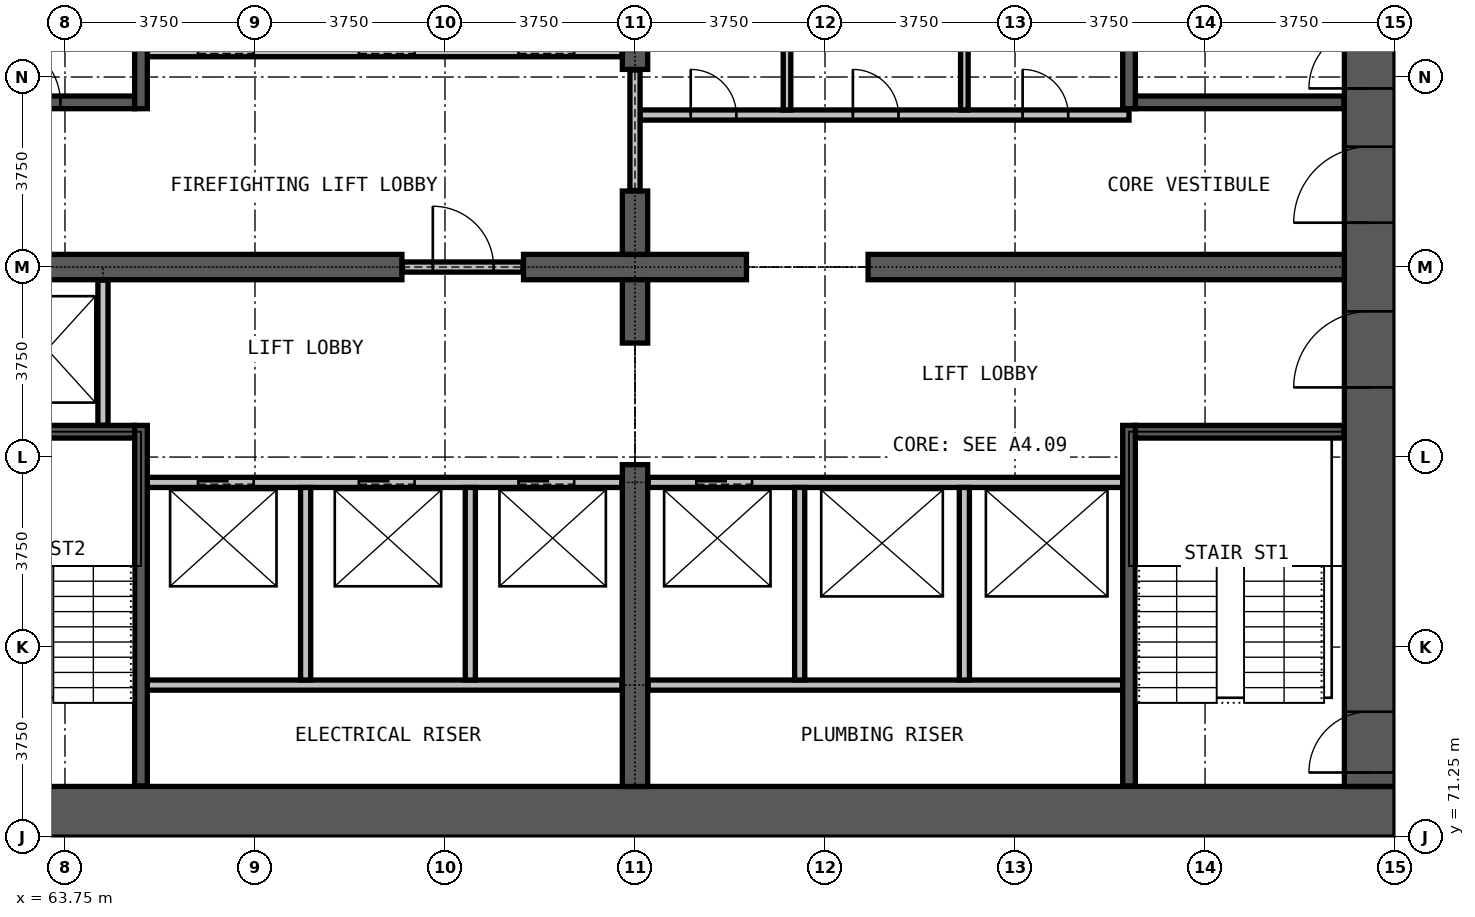
"""IFC4 building model, lengths in metres.
Left out: names, types, materials, properties, quantities, classifications, styles, units other than length and angle.
Written with IfcOpenShell. Run it as: python <this file> out.ifc"""

import sys

from ifc_helpers import new_model, si_unit, direction, frame, frame_2d, origin, place, context, subcontext, project, spatial, rectangle, extrude, element, fill, save


model = new_model("IFC4")
c1 = context("Model", 3, precision=1e-05, world=origin(), true_north=direction((0.0, 1.0)))
c2 = subcontext(c1, "Body", "Model", "MODEL_VIEW")
j1 = project(units=[si_unit("LENGTHUNIT", "METRE"), si_unit("PLANEANGLEUNIT", "RADIAN")], contexts=[c1])
p1 = place(None, origin())
s1 = spatial("IfcSite", under=j1, at=p1, CompositionType="ELEMENT")
p2 = place(p1, origin())
s2 = spatial("IfcBuilding", under=s1, at=p2, CompositionType="ELEMENT")
p3 = place(p2, frame((0.0, 0.0, 69.2)))
s3 = spatial("IfcBuildingStorey", under=s2, at=p3, CompositionType="ELEMENT", Elevation=69.2)
p4 = place(p3, frame((60.0, 71.75, 0.0), z_axis=(0.0, 0.0, 1.0), x_axis=(1.0, 0.0, 0.0)))
e1 = element("IfcWall", 1, at=p4, inside=s3, PredefinedType="SHEAR", context=c2, shape_type="SweptSolid", body=[
    extrude(rectangle(XDim=30.0, YDim=1.0, at=frame_2d((15.0, 0.0))), origin(), (0.0, 0.0, 1.0), 3.3),
])
p5 = place(p3, frame((89.5, 72.25, 0.0), z_axis=(0.0, 0.0, 1.0), x_axis=(0.0, 1.0, 0.0)))
e2 = element("IfcWall", 2, at=p5, inside=s3, PredefinedType="SHEAR", context=c2, shape_type="SweptSolid", body=[
    extrude(rectangle(XDim=20.5, YDim=1.0, at=frame_2d((10.25, 0.0))), origin(), (0.0, 0.0, 1.0), 3.3),
])
p6 = place(p5, frame((0.275, 0.0, 0.0)))
e3 = element("IfcOpeningElement", 3, at=p6, cuts=e2, PredefinedType="OPENING", context=c2, shape_type="SweptSolid", body=[
    extrude(rectangle(XDim=1.2, YDim=2.2, at=frame_2d((0.6, 1.1))), frame((0.0, 0.51, 0.0), z_axis=(0.0, -1.0, 0.0), x_axis=(1.0, 0.0, 0.0)), (0.0, 0.0, 1.0), 1.02),
])
p7 = place(p5, frame((13.775, 0.0, 0.0)))
e4 = element("IfcOpeningElement", 4, at=p7, cuts=e2, PredefinedType="OPENING", context=c2, shape_type="SweptSolid", body=[
    extrude(rectangle(XDim=1.2, YDim=2.2, at=frame_2d((0.6, 1.1))), frame((0.0, 0.51, 0.0), z_axis=(0.0, -1.0, 0.0), x_axis=(1.0, 0.0, 0.0)), (0.0, 0.0, 1.0), 1.02),
])
p8 = place(p5, frame((7.875, 0.0, 0.0)))
e5 = element("IfcOpeningElement", 5, at=p8, cuts=e2, PredefinedType="OPENING", context=c2, shape_type="SweptSolid", body=[
    extrude(rectangle(XDim=1.5, YDim=2.2, at=frame_2d((0.75, 1.1))), frame((0.0, 0.51, 0.0), z_axis=(0.0, -1.0, 0.0), x_axis=(1.0, 0.0, 0.0)), (0.0, 0.0, 1.0), 1.02),
])
p9 = place(p5, frame((11.125, 0.0, 0.0)))
e6 = element("IfcOpeningElement", 6, at=p9, cuts=e2, PredefinedType="OPENING", context=c2, shape_type="SweptSolid", body=[
    extrude(rectangle(XDim=1.5, YDim=2.2, at=frame_2d((0.75, 1.1))), frame((0.0, 0.51, 0.0), z_axis=(0.0, -1.0, 0.0), x_axis=(1.0, 0.0, 0.0)), (0.0, 0.0, 1.0), 1.02),
])
p10 = place(p3, frame((61.0, 82.5, 0.0), z_axis=(0.0, 0.0, 1.0), x_axis=(1.0, 0.0, 0.0)))
e7 = element("IfcWall", 7, at=p10, inside=s3, PredefinedType="SHEAR", context=c2, shape_type="SweptSolid", body=[
    extrude(rectangle(XDim=9.4, YDim=0.5, at=frame_2d((4.7, 0.0))), origin(), (0.0, 0.0, 1.0), 3.3),
])
p11 = place(p3, frame((72.8, 82.5, 0.0), z_axis=(0.0, 0.0, 1.0), x_axis=(1.0, 0.0, 0.0)))
e8 = element("IfcWall", 8, at=p11, inside=s3, PredefinedType="SHEAR", context=c2, shape_type="SweptSolid", body=[
    extrude(rectangle(XDim=4.4, YDim=0.5, at=frame_2d((2.2, 0.0))), origin(), (0.0, 0.0, 1.0), 3.3),
])
p12 = place(p3, frame((79.6, 82.5, 0.0), z_axis=(0.0, 0.0, 1.0), x_axis=(1.0, 0.0, 0.0)))
e9 = element("IfcWall", 9, at=p12, inside=s3, PredefinedType="SHEAR", context=c2, shape_type="SweptSolid", body=[
    extrude(rectangle(XDim=9.4, YDim=0.5, at=frame_2d((4.7, 0.0))), origin(), (0.0, 0.0, 1.0), 3.3),
])
p13 = place(p3, frame((75.0, 72.25, 0.0), z_axis=(0.0, 0.0, 1.0), x_axis=(0.0, 1.0, 0.0)))
e10 = element("IfcWall", 10, at=p13, inside=s3, PredefinedType="SHEAR", context=c2, shape_type="SweptSolid", body=[
    extrude(rectangle(XDim=6.35, YDim=0.5, at=frame_2d((3.175, 0.0))), origin(), (0.0, 0.0, 1.0), 3.3),
])
for number, where, z_axis, x_axis in (
    (11, (75.0, 81.0, 0.0), (0.0, 0.0, 1.0), (0.0, 1.0, 0.0)),
    (12, (75.0, 82.75, 0.0), (0.0, 0.0, 1.0), (0.0, 1.0, 0.0)),
):
    element("IfcWall", number, at=place(p3, frame(where, z_axis=z_axis, x_axis=x_axis)), inside=s3, PredefinedType="SHEAR", context=c2, shape_type="SweptSolid", body=[
        extrude(rectangle(XDim=1.25, YDim=0.5, at=frame_2d((0.625, 0.0))), origin(), (0.0, 0.0, 1.0), 3.3),
    ])
p14 = place(p3, frame((75.0, 86.4, 0.0), z_axis=(0.0, 0.0, 1.0), x_axis=(0.0, 1.0, 0.0)))
e13 = element("IfcWall", 13, at=p14, inside=s3, PredefinedType="SHEAR", context=c2, shape_type="SweptSolid", body=[
    extrude(rectangle(XDim=6.35, YDim=0.5, at=frame_2d((3.175, 0.0))), origin(), (0.0, 0.0, 1.0), 3.3),
])
p15 = place(p3, frame((70.41, 82.5, 0.0), z_axis=(0.0, 0.0, 1.0), x_axis=(1.0, 0.0, 0.0)))
e14 = element("IfcWall", 14, at=p15, inside=s3, PredefinedType="PARTITIONING", context=c2, shape_type="SweptSolid", body=[
    extrude(rectangle(XDim=2.38, YDim=0.2, at=frame_2d((1.19, 0.0))), origin(), (0.0, 0.0, 1.0), 2.4),
])
p16 = place(p15, frame((0.6, 0.0, 0.0)))
e15 = element("IfcOpeningElement", 15, at=p16, cuts=e14, PredefinedType="OPENING", context=c2, shape_type="SweptSolid", body=[
    extrude(rectangle(XDim=1.2, YDim=2.2, at=frame_2d((0.6, 1.1))), frame((0.0, 0.11, 0.0), z_axis=(0.0, -1.0, 0.0), x_axis=(1.0, 0.0, 0.0)), (0.0, 0.0, 1.0), 0.22),
])
p17 = place(p3, frame((75.1, 85.5, 0.0), z_axis=(0.0, 0.0, 1.0), x_axis=(1.0, 0.0, 0.0)))
e16 = element("IfcWall", 16, at=p17, inside=s3, PredefinedType="PARTITIONING", context=c2, shape_type="SweptSolid", body=[
    extrude(rectangle(XDim=9.65, YDim=0.2, at=frame_2d((4.825, 0.0))), origin(), (0.0, 0.0, 1.0), 3.0),
])
p18 = place(p17, frame((1.0, 0.0, 0.0)))
e17 = element("IfcOpeningElement", 17, at=p18, cuts=e16, PredefinedType="OPENING", context=c2, shape_type="SweptSolid", body=[
    extrude(rectangle(XDim=0.9, YDim=2.2, at=frame_2d((0.45, 1.1))), frame((0.0, 0.11, 0.0), z_axis=(0.0, -1.0, 0.0), x_axis=(1.0, 0.0, 0.0)), (0.0, 0.0, 1.0), 0.22),
])
p19 = place(p17, frame((4.2, 0.0, 0.0)))
e18 = element("IfcOpeningElement", 18, at=p19, cuts=e16, PredefinedType="OPENING", context=c2, shape_type="SweptSolid", body=[
    extrude(rectangle(XDim=0.9, YDim=2.2, at=frame_2d((0.45, 1.1))), frame((0.0, 0.11, 0.0), z_axis=(0.0, -1.0, 0.0), x_axis=(1.0, 0.0, 0.0)), (0.0, 0.0, 1.0), 0.22),
])
p20 = place(p17, frame((7.55, 0.0, 0.0)))
e19 = element("IfcOpeningElement", 19, at=p20, cuts=e16, PredefinedType="OPENING", context=c2, shape_type="SweptSolid", body=[
    extrude(rectangle(XDim=0.9, YDim=2.2, at=frame_2d((0.45, 1.1))), frame((0.0, 0.11, 0.0), z_axis=(0.0, -1.0, 0.0), x_axis=(1.0, 0.0, 0.0)), (0.0, 0.0, 1.0), 0.22),
])
p21 = place(p3, frame((75.0, 84.01, 0.0), z_axis=(0.0, 0.0, 1.0), x_axis=(0.0, 1.0, 0.0)))
e20 = element("IfcWall", 20, at=p21, inside=s3, PredefinedType="PARTITIONING", context=c2, shape_type="SweptSolid", body=[
    extrude(rectangle(XDim=2.38, YDim=0.2, at=frame_2d((1.19, 0.0))), origin(), (0.0, 0.0, 1.0), 2.4),
])
for number, where, z_axis, x_axis in (
    (21, (78.0, 85.6, 0.0), (0.0, 0.0, 1.0), (0.0, 1.0, 0.0)),
    (22, (81.5, 85.6, 0.0), (0.0, 0.0, 1.0), (0.0, 1.0, 0.0)),
):
    element("IfcWall", number, at=place(p3, frame(where, z_axis=z_axis, x_axis=x_axis)), inside=s3, PredefinedType="PARTITIONING", context=c2, shape_type="SweptSolid", body=[
        extrude(rectangle(XDim=5.05, YDim=0.15, at=frame_2d((2.525, 0.0))), origin(), (0.0, 0.0, 1.0), 3.0),
    ])
for number, where, z_axis, x_axis in (
    (23, (65.375, 74.25, 0.0), (0.0, 0.0, 1.0), (1.0, 0.0, 0.0)),
    (24, (75.26, 74.25, 0.0), (0.0, 0.0, 1.0), (1.0, 0.0, 0.0)),
):
    element("IfcWall", number, at=place(p3, frame(where, z_axis=z_axis, x_axis=x_axis)), inside=s3, PredefinedType="PARTITIONING", context=c2, shape_type="SweptSolid", body=[
        extrude(rectangle(XDim=9.365, YDim=0.2, at=frame_2d((4.683, 0.0))), origin(), (0.0, 0.0, 1.0), 3.0),
    ])
p22 = place(p3, frame((65.375, 78.25, 0.0), z_axis=(0.0, 0.0, 1.0), x_axis=(1.0, 0.0, 0.0)))
e25 = element("IfcWall", 25, at=p22, inside=s3, PredefinedType="PARTITIONING", context=c2, shape_type="SweptSolid", body=[
    extrude(rectangle(XDim=9.365, YDim=0.2, at=frame_2d((4.683, 0.0))), origin(), (0.0, 0.0, 1.0), 3.0),
])
p23 = place(p22, frame((1.0, 0.0, 0.0)))
e26 = element("IfcOpeningElement", 26, at=p23, cuts=e25, PredefinedType="OPENING", context=c2, shape_type="SweptSolid", body=[
    extrude(rectangle(XDim=1.1, YDim=2.2, at=frame_2d((0.55, 1.1))), frame((0.0, 0.11, 0.0), z_axis=(0.0, -1.0, 0.0), x_axis=(1.0, 0.0, 0.0)), (0.0, 0.0, 1.0), 0.22),
])
p24 = place(p22, frame((4.175, 0.0, 0.0)))
e27 = element("IfcOpeningElement", 27, at=p24, cuts=e25, PredefinedType="OPENING", context=c2, shape_type="SweptSolid", body=[
    extrude(rectangle(XDim=1.1, YDim=2.2, at=frame_2d((0.55, 1.1))), frame((0.0, 0.11, 0.0), z_axis=(0.0, -1.0, 0.0), x_axis=(1.0, 0.0, 0.0)), (0.0, 0.0, 1.0), 0.22),
])
p25 = place(p22, frame((7.325, 0.0, 0.0)))
e28 = element("IfcOpeningElement", 28, at=p25, cuts=e25, PredefinedType="OPENING", context=c2, shape_type="SweptSolid", body=[
    extrude(rectangle(XDim=1.1, YDim=2.2, at=frame_2d((0.55, 1.1))), frame((0.0, 0.11, 0.0), z_axis=(0.0, -1.0, 0.0), x_axis=(1.0, 0.0, 0.0)), (0.0, 0.0, 1.0), 0.22),
])
p26 = place(p3, frame((75.26, 78.25, 0.0), z_axis=(0.0, 0.0, 1.0), x_axis=(1.0, 0.0, 0.0)))
e29 = element("IfcWall", 29, at=p26, inside=s3, PredefinedType="PARTITIONING", context=c2, shape_type="SweptSolid", body=[
    extrude(rectangle(XDim=9.365, YDim=0.2, at=frame_2d((4.683, 0.0))), origin(), (0.0, 0.0, 1.0), 3.0),
])
p27 = place(p26, frame((0.95, 0.0, 0.0)))
e30 = element("IfcOpeningElement", 30, at=p27, cuts=e29, PredefinedType="OPENING", context=c2, shape_type="SweptSolid", body=[
    extrude(rectangle(XDim=1.1, YDim=2.2, at=frame_2d((0.55, 1.1))), frame((0.0, 0.11, 0.0), z_axis=(0.0, -1.0, 0.0), x_axis=(1.0, 0.0, 0.0)), (0.0, 0.0, 1.0), 0.22),
])
p28 = place(p3, frame((65.375, 86.75, 0.0), z_axis=(0.0, 0.0, 1.0), x_axis=(1.0, 0.0, 0.0)))
e31 = element("IfcWall", 31, at=p28, inside=s3, PredefinedType="PARTITIONING", context=c2, shape_type="SweptSolid", body=[
    extrude(rectangle(XDim=9.365, YDim=0.2, at=frame_2d((4.683, 0.0))), origin(), (0.0, 0.0, 1.0), 3.0),
])
p29 = place(p28, frame((1.0, 0.0, 0.0)))
e32 = element("IfcOpeningElement", 32, at=p29, cuts=e31, PredefinedType="OPENING", context=c2, shape_type="SweptSolid", body=[
    extrude(rectangle(XDim=1.1, YDim=2.2, at=frame_2d((0.55, 1.1))), frame((0.0, 0.11, 0.0), z_axis=(0.0, -1.0, 0.0), x_axis=(1.0, 0.0, 0.0)), (0.0, 0.0, 1.0), 0.22),
])
p30 = place(p28, frame((4.175, 0.0, 0.0)))
e33 = element("IfcOpeningElement", 33, at=p30, cuts=e31, PredefinedType="OPENING", context=c2, shape_type="SweptSolid", body=[
    extrude(rectangle(XDim=1.1, YDim=2.2, at=frame_2d((0.55, 1.1))), frame((0.0, 0.11, 0.0), z_axis=(0.0, -1.0, 0.0), x_axis=(1.0, 0.0, 0.0)), (0.0, 0.0, 1.0), 0.22),
])
p31 = place(p28, frame((7.325, 0.0, 0.0)))
e34 = element("IfcOpeningElement", 34, at=p31, cuts=e31, PredefinedType="OPENING", context=c2, shape_type="SweptSolid", body=[
    extrude(rectangle(XDim=1.1, YDim=2.2, at=frame_2d((0.55, 1.1))), frame((0.0, 0.11, 0.0), z_axis=(0.0, -1.0, 0.0), x_axis=(1.0, 0.0, 0.0)), (0.0, 0.0, 1.0), 0.22),
])
p32 = place(p3, frame((64.5, 79.375, 0.0), z_axis=(0.0, 0.0, 1.0), x_axis=(0.0, 1.0, 0.0)))
e35 = element("IfcWall", 35, at=p32, inside=s3, PredefinedType="PARTITIONING", context=c2, shape_type="SweptSolid", body=[
    extrude(rectangle(XDim=2.865, YDim=0.2, at=frame_2d((1.433, 0.0))), origin(), (0.0, 0.0, 1.0), 3.0),
])
for number, where, z_axis, x_axis in (
    (36, (68.5, 74.35, 0.0), (0.0, 0.0, 1.0), (0.0, 1.0, 0.0)),
    (37, (71.75, 74.35, 0.0), (0.0, 0.0, 1.0), (0.0, 1.0, 0.0)),
    (38, (78.25, 74.35, 0.0), (0.0, 0.0, 1.0), (0.0, 1.0, 0.0)),
    (39, (81.5, 74.35, 0.0), (0.0, 0.0, 1.0), (0.0, 1.0, 0.0)),
):
    element("IfcWall", number, at=place(p3, frame(where, z_axis=z_axis, x_axis=x_axis)), inside=s3, PredefinedType="PARTITIONING", context=c2, shape_type="SweptSolid", body=[
        extrude(rectangle(XDim=3.8, YDim=0.2, at=frame_2d((1.9, 0.0))), origin(), (0.0, 0.0, 1.0), 3.0),
    ])
for number, where, z_axis, x_axis in (
    (40, (61.01, 79.25, 0.0), (0.0, 0.0, 1.0), (1.0, 0.0, 0.0)),
    (41, (84.875, 79.25, 0.0), (0.0, 0.0, 1.0), (1.0, 0.0, 0.0)),
):
    element("IfcWall", number, at=place(p3, frame(where, z_axis=z_axis, x_axis=x_axis)), inside=s3, PredefinedType="PARTITIONING", context=c2, shape_type="SweptSolid", body=[
        extrude(rectangle(XDim=4.115, YDim=0.25, at=frame_2d((2.058, 0.0))), origin(), (0.0, 0.0, 1.0), 3.0),
    ])
p33 = place(p3, frame((61.01, 85.75, 0.0), z_axis=(0.0, 0.0, 1.0), x_axis=(1.0, 0.0, 0.0)))
e42 = element("IfcWall", 42, at=p33, inside=s3, PredefinedType="PARTITIONING", context=c2, shape_type="SweptSolid", body=[
    extrude(rectangle(XDim=4.115, YDim=0.25, at=frame_2d((2.058, 0.0))), origin(), (0.0, 0.0, 1.0), 3.0),
])
p34 = place(p33, frame((1.45, 0.0, 0.0)))
e43 = element("IfcOpeningElement", 43, at=p34, cuts=e42, PredefinedType="OPENING", context=c2, shape_type="SweptSolid", body=[
    extrude(rectangle(XDim=1.2, YDim=2.2, at=frame_2d((0.6, 1.1))), frame((0.0, 0.135, 0.0), z_axis=(0.0, -1.0, 0.0), x_axis=(1.0, 0.0, 0.0)), (0.0, 0.0, 1.0), 0.27),
])
p35 = place(p3, frame((84.875, 85.75, 0.0), z_axis=(0.0, 0.0, 1.0), x_axis=(1.0, 0.0, 0.0)))
e44 = element("IfcWall", 44, at=p35, inside=s3, PredefinedType="PARTITIONING", context=c2, shape_type="SweptSolid", body=[
    extrude(rectangle(XDim=4.115, YDim=0.25, at=frame_2d((2.058, 0.0))), origin(), (0.0, 0.0, 1.0), 3.0),
])
for number, where, z_axis, x_axis in (
    (45, (65.25, 72.26, 0.0), (0.0, 0.0, 1.0), (0.0, 1.0, 0.0)),
    (46, (65.25, 85.625, 0.0), (0.0, 0.0, 1.0), (0.0, 1.0, 0.0)),
    (47, (84.75, 72.26, 0.0), (0.0, 0.0, 1.0), (0.0, 1.0, 0.0)),
    (48, (84.75, 85.625, 0.0), (0.0, 0.0, 1.0), (0.0, 1.0, 0.0)),
):
    element("IfcWall", number, at=place(p3, frame(where, z_axis=z_axis, x_axis=x_axis)), inside=s3, PredefinedType="PARTITIONING", context=c2, shape_type="SweptSolid", body=[
        extrude(rectangle(XDim=7.115, YDim=0.25, at=frame_2d((3.558, 0.0))), origin(), (0.0, 0.0, 1.0), 3.0),
    ])
p36 = place(p23, origin())
e49 = element("IfcDoor", 49, at=p36, inside=s3, OperationType="DOUBLE_DOOR_SLIDING", PredefinedType="DOOR", context=c2, shape_type="SweptSolid", body=[
    extrude(rectangle(XDim=1.1, YDim=2.2, at=frame_2d((0.55, 1.1))), frame((0.0, 0.025, 0.0), z_axis=(0.0, -1.0, 0.0), x_axis=(1.0, 0.0, 0.0)), (0.0, 0.0, 1.0), 0.05),
])
fill(e26, e49)
p37 = place(p24, origin())
e50 = element("IfcDoor", 50, at=p37, inside=s3, OperationType="DOUBLE_DOOR_SLIDING", PredefinedType="DOOR", context=c2, shape_type="SweptSolid", body=[
    extrude(rectangle(XDim=1.1, YDim=2.2, at=frame_2d((0.55, 1.1))), frame((0.0, 0.025, 0.0), z_axis=(0.0, -1.0, 0.0), x_axis=(1.0, 0.0, 0.0)), (0.0, 0.0, 1.0), 0.05),
])
fill(e27, e50)
p38 = place(p25, origin())
e51 = element("IfcDoor", 51, at=p38, inside=s3, OperationType="DOUBLE_DOOR_SLIDING", PredefinedType="DOOR", context=c2, shape_type="SweptSolid", body=[
    extrude(rectangle(XDim=1.1, YDim=2.2, at=frame_2d((0.55, 1.1))), frame((0.0, 0.025, 0.0), z_axis=(0.0, -1.0, 0.0), x_axis=(1.0, 0.0, 0.0)), (0.0, 0.0, 1.0), 0.05),
])
fill(e28, e51)
p39 = place(p27, origin())
e52 = element("IfcDoor", 52, at=p39, inside=s3, OperationType="DOUBLE_DOOR_SLIDING", PredefinedType="DOOR", context=c2, shape_type="SweptSolid", body=[
    extrude(rectangle(XDim=1.1, YDim=2.2, at=frame_2d((0.55, 1.1))), frame((0.0, 0.025, 0.0), z_axis=(0.0, -1.0, 0.0), x_axis=(1.0, 0.0, 0.0)), (0.0, 0.0, 1.0), 0.05),
])
fill(e30, e52)
p40 = place(p29, origin())
e53 = element("IfcDoor", 53, at=p40, inside=s3, OperationType="DOUBLE_DOOR_SLIDING", PredefinedType="DOOR", context=c2, shape_type="SweptSolid", body=[
    extrude(rectangle(XDim=1.1, YDim=2.2, at=frame_2d((0.55, 1.1))), frame((0.0, 0.025, 0.0), z_axis=(0.0, -1.0, 0.0), x_axis=(1.0, 0.0, 0.0)), (0.0, 0.0, 1.0), 0.05),
])
fill(e32, e53)
p41 = place(p30, origin())
e54 = element("IfcDoor", 54, at=p41, inside=s3, OperationType="DOUBLE_DOOR_SLIDING", PredefinedType="DOOR", context=c2, shape_type="SweptSolid", body=[
    extrude(rectangle(XDim=1.1, YDim=2.2, at=frame_2d((0.55, 1.1))), frame((0.0, 0.025, 0.0), z_axis=(0.0, -1.0, 0.0), x_axis=(1.0, 0.0, 0.0)), (0.0, 0.0, 1.0), 0.05),
])
fill(e33, e54)
p42 = place(p31, origin())
e55 = element("IfcDoor", 55, at=p42, inside=s3, OperationType="DOUBLE_DOOR_SLIDING", PredefinedType="DOOR", context=c2, shape_type="SweptSolid", body=[
    extrude(rectangle(XDim=1.1, YDim=2.2, at=frame_2d((0.55, 1.1))), frame((0.0, 0.025, 0.0), z_axis=(0.0, -1.0, 0.0), x_axis=(1.0, 0.0, 0.0)), (0.0, 0.0, 1.0), 0.05),
])
fill(e34, e55)
p43 = place(p16, origin())
e56 = element("IfcDoor", 56, at=p43, inside=s3, OperationType="SINGLE_SWING_RIGHT", PredefinedType="DOOR", context=c2, shape_type="SweptSolid", body=[
    extrude(rectangle(XDim=1.2, YDim=2.2, at=frame_2d((0.6, 1.1))), frame((0.0, 0.025, 0.0), z_axis=(0.0, -1.0, 0.0), x_axis=(1.0, 0.0, 0.0)), (0.0, 0.0, 1.0), 0.05),
])
fill(e15, e56)
p44 = place(p34, origin())
e57 = element("IfcDoor", 57, at=p44, inside=s3, OperationType="SINGLE_SWING_LEFT", PredefinedType="DOOR", context=c2, shape_type="SweptSolid", body=[
    extrude(rectangle(XDim=1.2, YDim=2.2, at=frame_2d((0.6, 1.1))), frame((0.0, 0.025, 0.0), z_axis=(0.0, -1.0, 0.0), x_axis=(1.0, 0.0, 0.0)), (0.0, 0.0, 1.0), 0.05),
])
fill(e43, e57)
p45 = place(p6, origin())
e58 = element("IfcDoor", 58, at=p45, inside=s3, OperationType="SINGLE_SWING_LEFT", PredefinedType="DOOR", context=c2, shape_type="SweptSolid", body=[
    extrude(rectangle(XDim=1.2, YDim=2.2, at=frame_2d((0.6, 1.1))), frame((0.0, 0.025, 0.0), z_axis=(0.0, -1.0, 0.0), x_axis=(1.0, 0.0, 0.0)), (0.0, 0.0, 1.0), 0.05),
])
fill(e3, e58)
p46 = place(p7, origin())
e59 = element("IfcDoor", 59, at=p46, inside=s3, OperationType="SINGLE_SWING_RIGHT", PredefinedType="DOOR", context=c2, shape_type="SweptSolid", body=[
    extrude(rectangle(XDim=1.2, YDim=2.2, at=frame_2d((0.6, 1.1))), frame((0.0, 0.025, 0.0), z_axis=(0.0, -1.0, 0.0), x_axis=(1.0, 0.0, 0.0)), (0.0, 0.0, 1.0), 0.05),
])
fill(e4, e59)
p47 = place(p8, origin())
e60 = element("IfcDoor", 60, at=p47, inside=s3, OperationType="DOUBLE_DOOR_SINGLE_SWING", PredefinedType="DOOR", context=c2, shape_type="SweptSolid", body=[
    extrude(rectangle(XDim=1.5, YDim=2.2, at=frame_2d((0.75, 1.1))), frame((0.0, 0.025, 0.0), z_axis=(0.0, -1.0, 0.0), x_axis=(1.0, 0.0, 0.0)), (0.0, 0.0, 1.0), 0.05),
])
fill(e5, e60)
p48 = place(p9, origin())
e61 = element("IfcDoor", 61, at=p48, inside=s3, OperationType="DOUBLE_DOOR_SINGLE_SWING", PredefinedType="DOOR", context=c2, shape_type="SweptSolid", body=[
    extrude(rectangle(XDim=1.5, YDim=2.2, at=frame_2d((0.75, 1.1))), frame((0.0, 0.025, 0.0), z_axis=(0.0, -1.0, 0.0), x_axis=(1.0, 0.0, 0.0)), (0.0, 0.0, 1.0), 0.05),
])
fill(e6, e61)
p49 = place(p18, origin())
e62 = element("IfcDoor", 62, at=p49, inside=s3, OperationType="SINGLE_SWING_LEFT", PredefinedType="DOOR", context=c2, shape_type="SweptSolid", body=[
    extrude(rectangle(XDim=0.9, YDim=2.2, at=frame_2d((0.45, 1.1))), frame((0.0, 0.025, 0.0), z_axis=(0.0, -1.0, 0.0), x_axis=(1.0, 0.0, 0.0)), (0.0, 0.0, 1.0), 0.05),
])
fill(e17, e62)
p50 = place(p19, origin())
e63 = element("IfcDoor", 63, at=p50, inside=s3, OperationType="SINGLE_SWING_RIGHT", PredefinedType="DOOR", context=c2, shape_type="SweptSolid", body=[
    extrude(rectangle(XDim=0.9, YDim=2.2, at=frame_2d((0.45, 1.1))), frame((0.0, 0.025, 0.0), z_axis=(0.0, -1.0, 0.0), x_axis=(1.0, 0.0, 0.0)), (0.0, 0.0, 1.0), 0.05),
])
fill(e18, e63)
p51 = place(p20, origin())
e64 = element("IfcDoor", 64, at=p51, inside=s3, OperationType="SINGLE_SWING_RIGHT", PredefinedType="DOOR", context=c2, shape_type="SweptSolid", body=[
    extrude(rectangle(XDim=0.9, YDim=2.2, at=frame_2d((0.45, 1.1))), frame((0.0, 0.025, 0.0), z_axis=(0.0, -1.0, 0.0), x_axis=(1.0, 0.0, 0.0)), (0.0, 0.0, 1.0), 0.05),
])
fill(e19, e64)
save(model, sys.argv[1])
